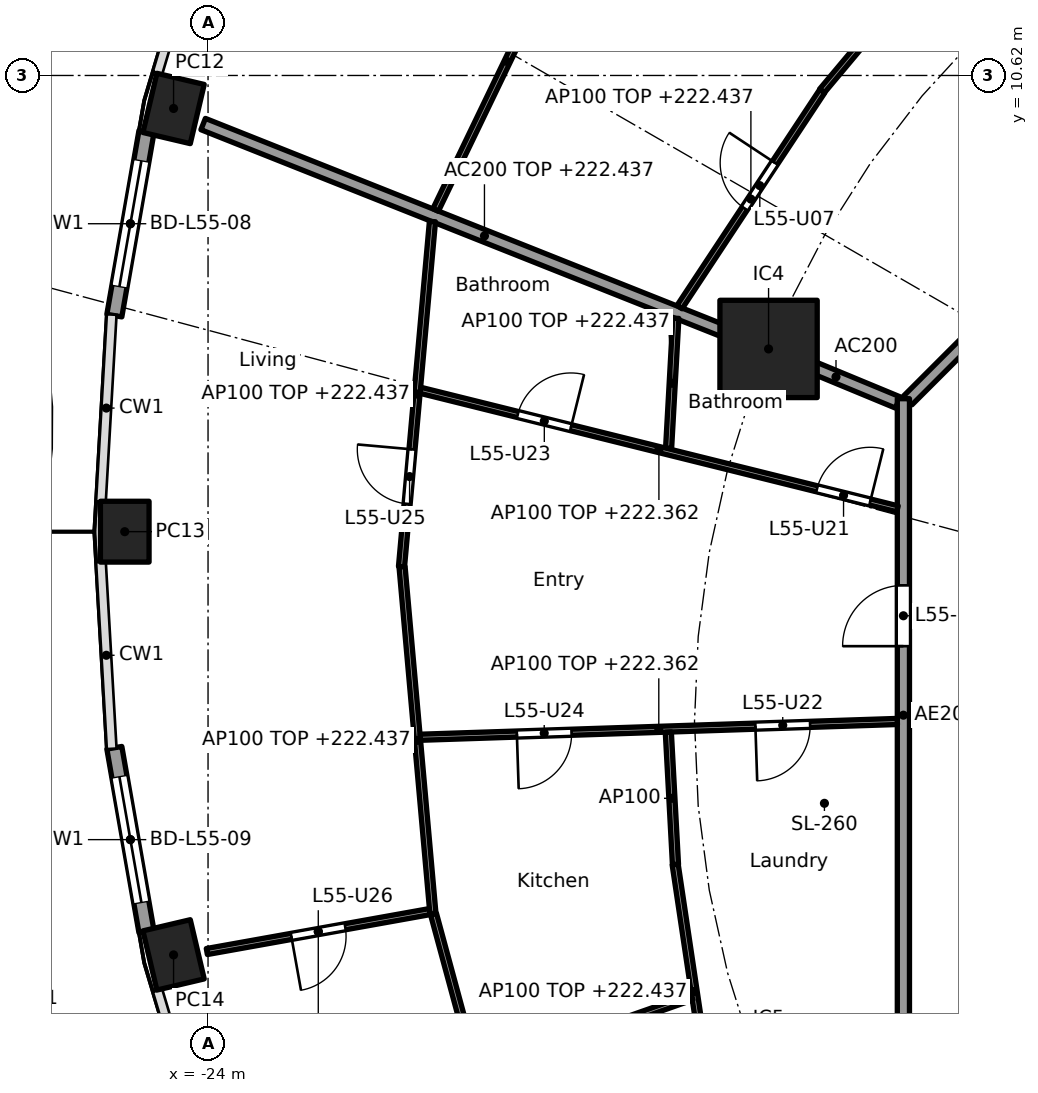
"""IFC4 building model, lengths in metres.
Left out: names, types, materials, properties, quantities, classifications, styles, units other than length and angle.
Written with IfcOpenShell. Run it as: python <this file> out.ifc"""

import sys

from ifc_helpers import new_model, si_unit, direction, frame, frame_2d, origin, origin_2d, place, context, subcontext, project, spatial, rectangle, hollow_rectangle, extrude, element, fill, save


model = new_model("IFC4")
c1 = context("Model", 3, precision=1e-05, world=origin(), true_north=direction((0.0, 1.0)))
c2 = subcontext(c1, "Body", "Model", "MODEL_VIEW")
j1 = project(units=[si_unit("LENGTHUNIT", "METRE"), si_unit("PLANEANGLEUNIT", "RADIAN")], contexts=[c1])
p1 = place(None, origin())
s1 = spatial("IfcSite", under=j1, at=p1, CompositionType="ELEMENT")
p2 = place(p1, origin())
s2 = spatial("IfcBuilding", under=s1, at=p2, CompositionType="ELEMENT")
p3 = place(p2, frame((0.0, 0.0, 219.6)))
s3 = spatial("IfcBuildingStorey", under=s2, at=p3, CompositionType="ELEMENT", Elevation=219.6)
for number, where, z_axis, x_axis in (
    (1, (-24.567, 10.077, 0.0), (0.0, 0.0, 1.0), (-0.229, -0.973, 0.0)),
    (2, (-25.37, 3.118, 0.0), (0.0, 0.0, 1.0), (0.0, -1.0, 0.0)),
    (3, (-24.567, -3.842, 0.0), (0.0, 0.0, 1.0), (0.229, -0.973, 0.0)),
):
    element("IfcColumn", number, at=place(p3, frame(where, z_axis=z_axis, x_axis=x_axis)), inside=s3, PredefinedType="COLUMN", context=c2, shape_type="SweptSolid", body=[
        extrude(hollow_rectangle(XDim=1.0, YDim=0.8, WallThickness=0.032, at=origin_2d()), origin(), (0.0, 0.0, 1.0), 3.7),
    ])
p4 = place(p3, frame((-14.782, 6.123, 0.0), z_axis=(0.0, 0.0, 1.0), x_axis=(1.0, 0.0, 0.0)))
e4 = element("IfcColumn", 4, at=p4, inside=s3, PredefinedType="COLUMN", context=c2, shape_type="SweptSolid", body=[
    extrude(rectangle(XDim=1.6, YDim=1.6, at=origin_2d()), origin(), (0.0, 0.0, 1.0), 3.7),
])
p5 = place(p3, frame((-25.541, 6.671, 0.0), z_axis=(0.0, 0.0, 1.0), x_axis=(0.172254823677, 0.985052422828, 0.0)))
e5 = element("IfcWall", 5, at=p5, inside=s3, PredefinedType="SOLIDWALL", context=c2, shape_type="SweptSolid", body=[
    extrude(rectangle(XDim=3.067, YDim=0.25, at=frame_2d((1.534, 0.0))), origin(), (0.0, 0.0, 1.0), 3.44),
])
p6 = place(p5, frame((0.484, 0.0, 0.0)))
e6 = element("IfcOpeningElement", 6, at=p6, cuts=e5, PredefinedType="OPENING", context=c2, shape_type="SweptSolid", body=[
    extrude(rectangle(XDim=2.1, YDim=2.4, at=frame_2d((1.05, 1.2))), frame((0.0, 0.135, 0.0), z_axis=(0.0, -1.0, 0.0), x_axis=(1.0, 0.0, 0.0)), (0.0, 0.0, 1.0), 0.27),
])
p7 = place(p3, frame((-25.013, -3.457, 0.0), z_axis=(0.0, 0.0, 1.0), x_axis=(-0.172241318156, 0.985054784426, 0.0)))
e7 = element("IfcWall", 7, at=p7, inside=s3, PredefinedType="SOLIDWALL", context=c2, shape_type="SweptSolid", body=[
    extrude(rectangle(XDim=3.067, YDim=0.25, at=frame_2d((1.534, 0.0))), origin(), (0.0, 0.0, 1.0), 3.44),
])
p8 = place(p7, frame((0.484, 0.0, 0.0)))
e8 = element("IfcOpeningElement", 8, at=p8, cuts=e7, PredefinedType="OPENING", context=c2, shape_type="SweptSolid", body=[
    extrude(rectangle(XDim=2.1, YDim=2.4, at=frame_2d((1.05, 1.2))), frame((0.0, 0.135, 0.0), z_axis=(0.0, -1.0, 0.0), x_axis=(1.0, 0.0, 0.0)), (0.0, 0.0, 1.0), 0.27),
])
p9 = place(p3, frame((-12.657, 5.243, 0.0), z_axis=(0.0, 0.0, 1.0), x_axis=(-0.923859888513, 0.38273085373, 0.0)))
e9 = element("IfcWall", 9, at=p9, inside=s3, PredefinedType="PARTITIONING", context=c2, shape_type="SweptSolid", body=[
    extrude(rectangle(XDim=2.199, YDim=0.2, at=frame_2d((1.1, 0.0))), origin(), (0.0, 0.0, 1.0), 3.44),
])
p10 = place(p3, frame((-14.829, 6.141, 0.0), z_axis=(0.0, 0.0, 1.0), x_axis=(-0.929202069098, 0.36957206981, 0.0)))
e10 = element("IfcWall", 10, at=p10, inside=s3, PredefinedType="PARTITIONING", context=c2, shape_type="SweptSolid", body=[
    extrude(rectangle(XDim=9.957, YDim=0.2, at=frame_2d((4.978, 0.0))), origin(), (0.0, 0.0, 1.0), 2.837),
])
p11 = place(p3, frame((-5.275, 12.494, 0.0), z_axis=(0.0, 0.0, 1.0), x_axis=(-0.707106781187, -0.707106781187, 0.0)))
e11 = element("IfcWall", 11, at=p11, inside=s3, PredefinedType="PARTITIONING", context=c2, shape_type="SweptSolid", body=[
    extrude(rectangle(XDim=10.209, YDim=0.2, at=frame_2d((5.104, 0.0))), origin(), (0.0, 0.0, 1.0), 3.44),
])
p12 = place(p11, frame((1.185, 0.0, 0.0)))
e12 = element("IfcOpeningElement", 12, at=p12, cuts=e11, PredefinedType="OPENING", context=c2, shape_type="SweptSolid", body=[
    extrude(rectangle(XDim=1.0, YDim=2.1, at=frame_2d((0.5, 1.05))), frame((0.0, 0.11, 0.0), z_axis=(0.0, -1.0, 0.0), x_axis=(1.0, 0.0, 0.0)), (0.0, 0.0, 1.0), 0.22),
])
p13 = place(p3, frame((-12.565, 5.304, 0.0), z_axis=(0.0, 0.0, 1.0), x_axis=(0.0, -1.0, 0.0)))
e13 = element("IfcWall", 13, at=p13, inside=s3, PredefinedType="PARTITIONING", context=c2, shape_type="SweptSolid", body=[
    extrude(rectangle(XDim=10.409, YDim=0.2, at=frame_2d((5.205, 0.0))), origin(), (0.0, 0.0, 1.0), 3.44),
])
p14 = place(p13, frame((3.07, 0.0, 0.0)))
e14 = element("IfcOpeningElement", 14, at=p14, cuts=e13, PredefinedType="OPENING", context=c2, shape_type="SweptSolid", body=[
    extrude(rectangle(XDim=1.0, YDim=2.1, at=frame_2d((0.5, 1.05))), frame((0.0, 0.11, 0.0), z_axis=(0.0, -1.0, 0.0), x_axis=(1.0, 0.0, 0.0)), (0.0, 0.0, 1.0), 0.22),
])
p15 = place(p3, frame((-7.725, 10.186, 0.0), z_axis=(0.0, 0.0, 1.0), x_axis=(-0.669819599194, 0.742523874725, 0.0)))
e15 = element("IfcWall", 15, at=p15, inside=s3, PredefinedType="PARTITIONING", context=c2, shape_type="SweptSolid", body=[
    extrude(rectangle(XDim=10.282, YDim=0.1, at=frame_2d((5.141, 0.0))), origin(), (0.0, 0.0, 1.0), 2.762),
])
p16 = place(p15, frame((2.0, 0.0, 0.0)))
e16 = element("IfcOpeningElement", 16, at=p16, cuts=e15, PredefinedType="OPENING", context=c2, shape_type="SweptSolid", body=[
    extrude(rectangle(XDim=0.9, YDim=2.1, at=frame_2d((0.45, 1.05))), frame((0.0, 0.06, 0.0), z_axis=(0.0, -1.0, 0.0), x_axis=(1.0, 0.0, 0.0)), (0.0, 0.0, 1.0), 0.12),
])
p17 = place(p15, frame((7.116, 0.0, 0.0)))
e17 = element("IfcOpeningElement", 17, at=p17, cuts=e15, PredefinedType="OPENING", context=c2, shape_type="SweptSolid", body=[
    extrude(rectangle(XDim=0.9, YDim=2.1, at=frame_2d((0.45, 1.05))), frame((0.0, 0.06, 0.0), z_axis=(0.0, -1.0, 0.0), x_axis=(1.0, 0.0, 0.0)), (0.0, 0.0, 1.0), 0.12),
])
p18 = place(p3, frame((-11.039, 13.785, 0.0), z_axis=(0.0, 0.0, 1.0), x_axis=(-0.642254625966, -0.766491353784, 0.0)))
e18 = element("IfcWall", 18, at=p18, inside=s3, PredefinedType="PARTITIONING", context=c2, shape_type="SweptSolid", body=[
    extrude(rectangle(XDim=4.461, YDim=0.1, at=frame_2d((2.23, 0.0))), origin(), (0.0, 0.0, 1.0), 2.837),
])
p19 = place(p3, frame((-13.899, 10.363, 0.0), z_axis=(0.0, 0.0, 1.0), x_axis=(-0.551267958114, -0.834328255758, 0.0)))
e19 = element("IfcWall", 19, at=p19, inside=s3, PredefinedType="PARTITIONING", context=c2, shape_type="SweptSolid", body=[
    extrude(rectangle(XDim=4.257, YDim=0.1, at=frame_2d((2.129, 0.0))), origin(), (0.0, 0.0, 1.0), 2.837),
])
p20 = place(p19, frame((1.413, 0.0, 0.0)))
e20 = element("IfcOpeningElement", 20, at=p20, cuts=e19, PredefinedType="OPENING", context=c2, shape_type="SweptSolid", body=[
    extrude(rectangle(XDim=0.9, YDim=2.1, at=frame_2d((0.45, 1.05))), frame((0.0, 0.06, 0.0), z_axis=(0.0, -1.0, 0.0), x_axis=(1.0, 0.0, 0.0)), (0.0, 0.0, 1.0), 0.12),
])
p21 = place(p3, frame((-17.904, 13.289, 0.0), z_axis=(0.0, 0.0, 1.0), x_axis=(-0.43429918566, -0.900768681369, 0.0)))
e21 = element("IfcWall", 21, at=p21, inside=s3, PredefinedType="PARTITIONING", context=c2, shape_type="SweptSolid", body=[
    extrude(rectangle(XDim=5.418, YDim=0.1, at=frame_2d((2.709, 0.0))), origin(), (0.0, 0.0, 1.0), 2.837),
])
p22 = place(p3, frame((-16.307, 6.627, 0.0), z_axis=(0.0, 0.0, 1.0), x_axis=(-0.055608865939, -0.998452629837, 0.0)))
e22 = element("IfcWall", 22, at=p22, inside=s3, PredefinedType="PARTITIONING", context=c2, shape_type="SweptSolid", body=[
    extrude(rectangle(XDim=2.143, YDim=0.1, at=frame_2d((1.071, 0.0))), origin(), (0.0, 0.0, 1.0), 2.837),
])
p23 = place(p3, frame((-20.31, 8.218, 0.0), z_axis=(0.0, 0.0, 1.0), x_axis=(-0.089284106956, -0.996006198899, 0.0)))
e23 = element("IfcWall", 23, at=p23, inside=s3, PredefinedType="PARTITIONING", context=c2, shape_type="SweptSolid", body=[
    extrude(rectangle(XDim=5.698, YDim=0.1, at=frame_2d((2.849, 0.0))), origin(), (0.0, 0.0, 1.0), 2.837),
])
p24 = place(p23, frame((3.761, 0.0, 0.0)))
e24 = element("IfcOpeningElement", 24, at=p24, cuts=e23, PredefinedType="OPENING", context=c2, shape_type="SweptSolid", body=[
    extrude(rectangle(XDim=0.9, YDim=2.1, at=frame_2d((0.45, 1.05))), frame((0.0, 0.06, 0.0), z_axis=(0.0, -1.0, 0.0), x_axis=(1.0, 0.0, 0.0)), (0.0, 0.0, 1.0), 0.12),
])
p25 = place(p3, frame((-12.662, 3.494, 0.0), z_axis=(0.0, 0.0, 1.0), x_axis=(-0.970505526029, 0.241078874951, 0.0)))
e25 = element("IfcWall", 25, at=p25, inside=s3, PredefinedType="PARTITIONING", context=c2, shape_type="SweptSolid", body=[
    extrude(rectangle(XDim=8.085, YDim=0.1, at=frame_2d((4.043, 0.0))), origin(), (0.0, 0.0, 1.0), 2.762),
])
p26 = place(p25, frame((0.464, 0.0, 0.0)))
e26 = element("IfcOpeningElement", 26, at=p26, cuts=e25, PredefinedType="OPENING", context=c2, shape_type="SweptSolid", body=[
    extrude(rectangle(XDim=0.9, YDim=2.1, at=frame_2d((0.45, 1.05))), frame((0.0, 0.06, 0.0), z_axis=(0.0, -1.0, 0.0), x_axis=(1.0, 0.0, 0.0)), (0.0, 0.0, 1.0), 0.12),
])
p27 = place(p25, frame((5.535, 0.0, 0.0)))
e27 = element("IfcOpeningElement", 27, at=p27, cuts=e25, PredefinedType="OPENING", context=c2, shape_type="SweptSolid", body=[
    extrude(rectangle(XDim=0.9, YDim=2.1, at=frame_2d((0.45, 1.05))), frame((0.0, 0.06, 0.0), z_axis=(0.0, -1.0, 0.0), x_axis=(1.0, 0.0, 0.0)), (0.0, 0.0, 1.0), 0.12),
])
p28 = place(p3, frame((-20.81, 2.542, 0.0), z_axis=(0.0, 0.0, 1.0), x_axis=(0.088651453697, -0.996062708748, 0.0)))
e28 = element("IfcWall", 28, at=p28, inside=s3, PredefinedType="PARTITIONING", context=c2, shape_type="SweptSolid", body=[
    extrude(rectangle(XDim=5.737, YDim=0.1, at=frame_2d((2.868, 0.0))), origin(), (0.0, 0.0, 1.0), 2.837),
])
p29 = place(p3, frame((-12.665, -0.003, 0.0), z_axis=(0.0, 0.0, 1.0), x_axis=(-0.999453263957, -0.033063169315, 0.0)))
e29 = element("IfcWall", 29, at=p29, inside=s3, PredefinedType="PARTITIONING", context=c2, shape_type="SweptSolid", body=[
    extrude(rectangle(XDim=7.849, YDim=0.1, at=frame_2d((3.925, 0.0))), origin(), (0.0, 0.0, 1.0), 2.762),
])
p30 = place(p29, frame((1.435, 0.0, 0.0)))
e30 = element("IfcOpeningElement", 30, at=p30, cuts=e29, PredefinedType="OPENING", context=c2, shape_type="SweptSolid", body=[
    extrude(rectangle(XDim=0.9, YDim=2.1, at=frame_2d((0.45, 1.05))), frame((0.0, 0.06, 0.0), z_axis=(0.0, -1.0, 0.0), x_axis=(1.0, 0.0, 0.0)), (0.0, 0.0, 1.0), 0.12),
])
p31 = place(p29, frame((5.36, 0.0, 0.0)))
e31 = element("IfcOpeningElement", 31, at=p31, cuts=e29, PredefinedType="OPENING", context=c2, shape_type="SweptSolid", body=[
    extrude(rectangle(XDim=0.9, YDim=2.1, at=frame_2d((0.45, 1.05))), frame((0.0, 0.06, 0.0), z_axis=(0.0, -1.0, 0.0), x_axis=(1.0, 0.0, 0.0)), (0.0, 0.0, 1.0), 0.12),
])
p32 = place(p3, frame((-16.431, -0.178, 0.0), z_axis=(0.0, 0.0, 1.0), x_axis=(0.053951127036, -0.998543577362, 0.0)))
e32 = element("IfcWall", 32, at=p32, inside=s3, PredefinedType="PARTITIONING", context=c2, shape_type="SweptSolid", body=[
    extrude(rectangle(XDim=2.181, YDim=0.1, at=frame_2d((1.091, 0.0))), origin(), (0.0, 0.0, 1.0), 3.44),
])
p33 = place(p3, frame((-16.318, -2.356, 0.0), z_axis=(0.0, 0.0, 1.0), x_axis=(0.147684413341, -0.989034536331, 0.0)))
e33 = element("IfcWall", 33, at=p33, inside=s3, PredefinedType="PARTITIONING", context=c2, shape_type="SweptSolid", body=[
    extrude(rectangle(XDim=4.222, YDim=0.1, at=frame_2d((2.111, 0.0))), origin(), (0.0, 0.0, 1.0), 2.837),
])
p34 = place(p3, frame((-20.355, -3.13, 0.0), z_axis=(0.0, 0.0, 1.0), x_axis=(-0.984331377639, -0.1763284974, 0.0)))
e34 = element("IfcWall", 34, at=p34, inside=s3, PredefinedType="PARTITIONING", context=c2, shape_type="SweptSolid", body=[
    extrude(rectangle(XDim=3.723, YDim=0.1, at=frame_2d((1.862, 0.0))), origin(), (0.0, 0.0, 1.0), 2.837),
])
p35 = place(p34, frame((1.412, 0.0, 0.0)))
e35 = element("IfcOpeningElement", 35, at=p35, cuts=e34, PredefinedType="OPENING", context=c2, shape_type="SweptSolid", body=[
    extrude(rectangle(XDim=0.9, YDim=2.1, at=frame_2d((0.45, 1.05))), frame((0.0, 0.06, 0.0), z_axis=(0.0, -1.0, 0.0), x_axis=(1.0, 0.0, 0.0)), (0.0, 0.0, 1.0), 0.12),
])
p36 = place(p3, frame((-20.292, -3.17, 0.0), z_axis=(0.0, 0.0, 1.0), x_axis=(0.26187906236, -0.965100697698, 0.0)))
e36 = element("IfcWall", 36, at=p36, inside=s3, PredefinedType="PARTITIONING", context=c2, shape_type="SweptSolid", body=[
    extrude(rectangle(XDim=5.356, YDim=0.1, at=frame_2d((2.678, 0.0))), origin(), (0.0, 0.0, 1.0), 2.837),
])
p37 = place(p36, frame((3.579, 0.0, 0.0)))
e37 = element("IfcOpeningElement", 37, at=p37, cuts=e36, PredefinedType="OPENING", context=c2, shape_type="SweptSolid", body=[
    extrude(rectangle(XDim=0.9, YDim=2.1, at=frame_2d((0.45, 1.05))), frame((0.0, 0.06, 0.0), z_axis=(0.0, -1.0, 0.0), x_axis=(1.0, 0.0, 0.0)), (0.0, 0.0, 1.0), 0.12),
])
p38 = place(p3, frame((-16.042, -4.535, 0.0), z_axis=(0.0, 0.0, 1.0), x_axis=(-0.94358986717, -0.331116539265, 0.0)))
e38 = element("IfcWall", 38, at=p38, inside=s3, PredefinedType="PARTITIONING", context=c2, shape_type="SweptSolid", body=[
    extrude(rectangle(XDim=3.704, YDim=0.1, at=frame_2d((1.852, 0.0))), origin(), (0.0, 0.0, 1.0), 3.44),
])
p39 = place(p6, origin())
e39 = element("IfcDoor", 39, at=p39, inside=s3, OperationType="SLIDING_TO_LEFT", PredefinedType="DOOR", context=c2, shape_type="SweptSolid", body=[
    extrude(rectangle(XDim=2.1, YDim=2.4, at=frame_2d((1.05, 1.2))), frame((0.0, 0.025, 0.0), z_axis=(0.0, -1.0, 0.0), x_axis=(1.0, 0.0, 0.0)), (0.0, 0.0, 1.0), 0.05),
])
fill(e6, e39)
p40 = place(p8, origin())
e40 = element("IfcDoor", 40, at=p40, inside=s3, OperationType="SLIDING_TO_LEFT", PredefinedType="DOOR", context=c2, shape_type="SweptSolid", body=[
    extrude(rectangle(XDim=2.1, YDim=2.4, at=frame_2d((1.05, 1.2))), frame((0.0, 0.025, 0.0), z_axis=(0.0, -1.0, 0.0), x_axis=(1.0, 0.0, 0.0)), (0.0, 0.0, 1.0), 0.05),
])
fill(e8, e40)
p41 = place(p20, frame((0.9, 0.0, 0.0), x_axis=(-1.0, 0.0, 0.0)))
e41 = element("IfcDoor", 41, at=p41, inside=s3, OperationType="SINGLE_SWING_RIGHT", PredefinedType="DOOR", context=c2, shape_type="SweptSolid", body=[
    extrude(rectangle(XDim=0.9, YDim=2.1, at=frame_2d((0.45, 1.05))), frame((0.0, 0.025, 0.0), z_axis=(0.0, -1.0, 0.0), x_axis=(1.0, 0.0, 0.0)), (0.0, 0.0, 1.0), 0.05),
])
fill(e20, e41)
p42 = place(p14, frame((1.0, 0.0, 0.0), x_axis=(-1.0, 0.0, 0.0)))
e42 = element("IfcDoor", 42, at=p42, inside=s3, OperationType="SINGLE_SWING_LEFT", PredefinedType="DOOR", context=c2, shape_type="SweptSolid", body=[
    extrude(rectangle(XDim=1.0, YDim=2.1, at=frame_2d((0.5, 1.05))), frame((0.0, 0.025, 0.0), z_axis=(0.0, -1.0, 0.0), x_axis=(1.0, 0.0, 0.0)), (0.0, 0.0, 1.0), 0.05),
])
fill(e14, e42)
p43 = place(p26, frame((0.9, 0.0, 0.0), x_axis=(-1.0, 0.0, 0.0)))
e43 = element("IfcDoor", 43, at=p43, inside=s3, OperationType="SINGLE_SWING_RIGHT", PredefinedType="DOOR", context=c2, shape_type="SweptSolid", body=[
    extrude(rectangle(XDim=0.9, YDim=2.1, at=frame_2d((0.45, 1.05))), frame((0.0, 0.025, 0.0), z_axis=(0.0, -1.0, 0.0), x_axis=(1.0, 0.0, 0.0)), (0.0, 0.0, 1.0), 0.05),
])
fill(e26, e43)
p44 = place(p30, origin())
e44 = element("IfcDoor", 44, at=p44, inside=s3, OperationType="SINGLE_SWING_RIGHT", PredefinedType="DOOR", context=c2, shape_type="SweptSolid", body=[
    extrude(rectangle(XDim=0.9, YDim=2.1, at=frame_2d((0.45, 1.05))), frame((0.0, 0.025, 0.0), z_axis=(0.0, -1.0, 0.0), x_axis=(1.0, 0.0, 0.0)), (0.0, 0.0, 1.0), 0.05),
])
fill(e30, e44)
p45 = place(p27, frame((0.9, 0.0, 0.0), x_axis=(-1.0, 0.0, 0.0)))
e45 = element("IfcDoor", 45, at=p45, inside=s3, OperationType="SINGLE_SWING_RIGHT", PredefinedType="DOOR", context=c2, shape_type="SweptSolid", body=[
    extrude(rectangle(XDim=0.9, YDim=2.1, at=frame_2d((0.45, 1.05))), frame((0.0, 0.025, 0.0), z_axis=(0.0, -1.0, 0.0), x_axis=(1.0, 0.0, 0.0)), (0.0, 0.0, 1.0), 0.05),
])
fill(e27, e45)
p46 = place(p31, origin())
e46 = element("IfcDoor", 46, at=p46, inside=s3, OperationType="SINGLE_SWING_RIGHT", PredefinedType="DOOR", context=c2, shape_type="SweptSolid", body=[
    extrude(rectangle(XDim=0.9, YDim=2.1, at=frame_2d((0.45, 1.05))), frame((0.0, 0.025, 0.0), z_axis=(0.0, -1.0, 0.0), x_axis=(1.0, 0.0, 0.0)), (0.0, 0.0, 1.0), 0.05),
])
fill(e31, e46)
p47 = place(p24, frame((0.9, 0.0, 0.0), x_axis=(-1.0, 0.0, 0.0)))
e47 = element("IfcDoor", 47, at=p47, inside=s3, OperationType="SINGLE_SWING_RIGHT", PredefinedType="DOOR", context=c2, shape_type="SweptSolid", body=[
    extrude(rectangle(XDim=0.9, YDim=2.1, at=frame_2d((0.45, 1.05))), frame((0.0, 0.025, 0.0), z_axis=(0.0, -1.0, 0.0), x_axis=(1.0, 0.0, 0.0)), (0.0, 0.0, 1.0), 0.05),
])
fill(e24, e47)
p48 = place(p35, origin())
e48 = element("IfcDoor", 48, at=p48, inside=s3, OperationType="SINGLE_SWING_RIGHT", PredefinedType="DOOR", context=c2, shape_type="SweptSolid", body=[
    extrude(rectangle(XDim=0.9, YDim=2.1, at=frame_2d((0.45, 1.05))), frame((0.0, 0.025, 0.0), z_axis=(0.0, -1.0, 0.0), x_axis=(1.0, 0.0, 0.0)), (0.0, 0.0, 1.0), 0.05),
])
fill(e35, e48)
save(model, sys.argv[1])
